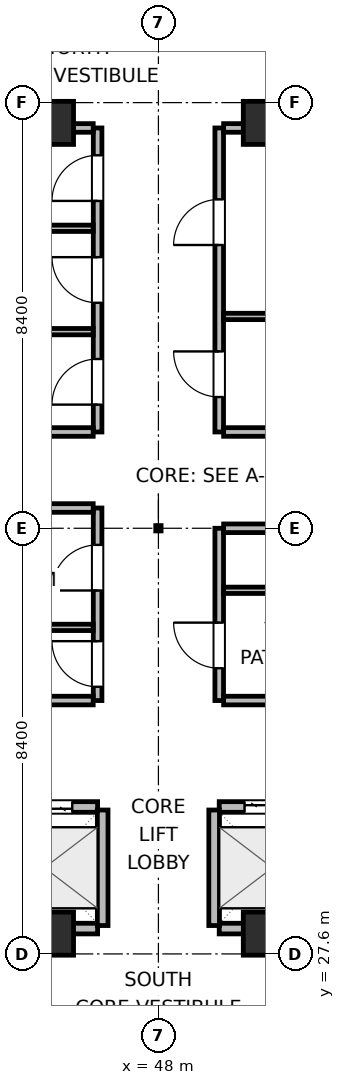
"""IFC4 building model, lengths in metres.
Left out: names, types, materials, properties, quantities, classifications, styles, units other than length and angle.
Written with IfcOpenShell. Run it as: python <this file> out.ifc"""

import sys

from ifc_helpers import new_model, si_unit, direction, frame, frame_2d, origin, origin_2d, place, context, subcontext, project, spatial, rectangle, extrude, element, fill, save


model = new_model("IFC4")
c1 = context("Model", 3, precision=1e-05, world=origin(), true_north=direction((0.0, 1.0)))
c2 = subcontext(c1, "Body", "Model", "MODEL_VIEW")
j1 = project(units=[si_unit("LENGTHUNIT", "METRE"), si_unit("PLANEANGLEUNIT", "RADIAN")], contexts=[c1])
p1 = place(None, origin())
s1 = spatial("IfcSite", under=j1, at=p1, CompositionType="ELEMENT")
p2 = place(p1, origin())
s2 = spatial("IfcBuilding", under=s1, at=p2, CompositionType="ELEMENT")
p3 = place(p2, frame((0.0, 0.0, 105.3)))
s3 = spatial("IfcBuildingStorey", under=s2, at=p3, CompositionType="ELEMENT", Elevation=105.3)
for number, where, z_axis, x_axis in (
    (1, (45.9, 28.0, 0.0), (0.0, 0.0, 1.0), (1.0, 0.0, 0.0)),
    (2, (50.1, 28.0, 0.0), (0.0, 0.0, 1.0), (1.0, 0.0, 0.0)),
    (3, (45.9, 44.0, 0.0), (0.0, 0.0, 1.0), (1.0, 0.0, 0.0)),
    (4, (50.1, 44.0, 0.0), (0.0, 0.0, 1.0), (1.0, 0.0, 0.0)),
):
    element("IfcColumn", number, at=place(p3, frame(where, z_axis=z_axis, x_axis=x_axis)), inside=s3, PredefinedType="COLUMN", context=c2, shape_type="SweptSolid", body=[
        extrude(rectangle(XDim=0.85, YDim=0.85, at=origin_2d()), origin(), (0.0, 0.0, 1.0), 3.9),
    ])
p4 = place(p3, frame((44.7, 30.5, 0.0), z_axis=(0.0, 0.0, 1.0), x_axis=(1.0, 0.0, 0.0)))
e5 = element("IfcWall", 5, at=p4, inside=s3, PredefinedType="PARTITIONING", context=c2, shape_type="SweptSolid", body=[
    extrude(rectangle(XDim=2.1, YDim=0.21, at=frame_2d((1.05, 0.0))), origin(), (0.0, 0.0, 1.0), 3.64),
])
p5 = place(p4, frame((0.5, 0.0, 0.0)))
e6 = element("IfcOpeningElement", 6, at=p5, cuts=e5, PredefinedType="OPENING", context=c2, shape_type="SweptSolid", body=[
    extrude(rectangle(XDim=1.1, YDim=2.04, at=frame_2d((0.55, 1.02))), frame((0.0, 0.115, 0.0), z_axis=(0.0, -1.0, 0.0), x_axis=(1.0, 0.0, 0.0)), (0.0, 0.0, 1.0), 0.23),
])
p6 = place(p3, frame((44.7, 28.1, 0.0), z_axis=(0.0, 0.0, 1.0), x_axis=(1.0, 0.0, 0.0)))
e7 = element("IfcWall", 7, at=p6, inside=s3, PredefinedType="PARTITIONING", context=c2, shape_type="SweptSolid", body=[
    extrude(rectangle(XDim=2.1, YDim=0.21, at=frame_2d((1.05, 0.0))), origin(), (0.0, 0.0, 1.0), 2.525),
])
p7 = place(p3, frame((46.9, 28.16, 0.0), z_axis=(0.0, 0.0, 1.0), x_axis=(0.0, 1.0, 0.0)))
e8 = element("IfcWall", 8, at=p7, inside=s3, PredefinedType="PARTITIONING", context=c2, shape_type="SweptSolid", body=[
    extrude(rectangle(XDim=2.28, YDim=0.21, at=frame_2d((1.14, 0.0))), origin(), (0.0, 0.0, 1.0), 3.64),
])
p8 = place(p3, frame((49.2, 30.5, 0.0), z_axis=(0.0, 0.0, 1.0), x_axis=(1.0, 0.0, 0.0)))
e9 = element("IfcWall", 9, at=p8, inside=s3, PredefinedType="PARTITIONING", context=c2, shape_type="SweptSolid", body=[
    extrude(rectangle(XDim=2.1, YDim=0.21, at=frame_2d((1.05, 0.0))), origin(), (0.0, 0.0, 1.0), 3.64),
])
p9 = place(p8, frame((0.5, 0.0, 0.0)))
e10 = element("IfcOpeningElement", 10, at=p9, cuts=e9, PredefinedType="OPENING", context=c2, shape_type="SweptSolid", body=[
    extrude(rectangle(XDim=1.1, YDim=2.04, at=frame_2d((0.55, 1.02))), frame((0.0, 0.115, 0.0), z_axis=(0.0, -1.0, 0.0), x_axis=(1.0, 0.0, 0.0)), (0.0, 0.0, 1.0), 0.23),
])
p10 = place(p3, frame((49.2, 28.1, 0.0), z_axis=(0.0, 0.0, 1.0), x_axis=(1.0, 0.0, 0.0)))
e11 = element("IfcWall", 11, at=p10, inside=s3, PredefinedType="PARTITIONING", context=c2, shape_type="SweptSolid", body=[
    extrude(rectangle(XDim=2.1, YDim=0.21, at=frame_2d((1.05, 0.0))), origin(), (0.0, 0.0, 1.0), 2.525),
])
p11 = place(p3, frame((49.1, 28.16, 0.0), z_axis=(0.0, 0.0, 1.0), x_axis=(0.0, 1.0, 0.0)))
e12 = element("IfcWall", 12, at=p11, inside=s3, PredefinedType="PARTITIONING", context=c2, shape_type="SweptSolid", body=[
    extrude(rectangle(XDim=2.28, YDim=0.21, at=frame_2d((1.14, 0.0))), origin(), (0.0, 0.0, 1.0), 3.64),
])
p12 = place(p3, frame((46.8, 32.6, 0.0), z_axis=(0.0, 0.0, 1.0), x_axis=(0.0, 1.0, 0.0)))
e13 = element("IfcWall", 13, at=p12, inside=s3, PredefinedType="PARTITIONING", context=c2, shape_type="SweptSolid", body=[
    extrude(rectangle(XDim=3.8, YDim=0.17, at=frame_2d((1.9, 0.0))), origin(), (0.0, 0.0, 1.0), 3.64),
])
p13 = place(p12, frame((0.272, 0.0, 0.0)))
e14 = element("IfcOpeningElement", 14, at=p13, cuts=e13, PredefinedType="OPENING", context=c2, shape_type="SweptSolid", body=[
    extrude(rectangle(XDim=0.9, YDim=2.02, at=frame_2d((0.45, 1.01))), frame((0.0, 0.095, 0.0), z_axis=(0.0, -1.0, 0.0), x_axis=(1.0, 0.0, 0.0)), (0.0, 0.0, 1.0), 0.19),
])
p14 = place(p12, frame((2.172, 0.0, 0.0)))
e15 = element("IfcOpeningElement", 15, at=p14, cuts=e13, PredefinedType="OPENING", context=c2, shape_type="SweptSolid", body=[
    extrude(rectangle(XDim=0.9, YDim=2.02, at=frame_2d((0.45, 1.01))), frame((0.0, 0.095, 0.0), z_axis=(0.0, -1.0, 0.0), x_axis=(1.0, 0.0, 0.0)), (0.0, 0.0, 1.0), 0.19),
])
for number, where, z_axis, x_axis in (
    (16, (43.8, 32.6, 0.0), (0.0, 0.0, 1.0), (1.0, 0.0, 0.0)),
    (17, (43.8, 36.4, 0.0), (0.0, 0.0, 1.0), (1.0, 0.0, 0.0)),
):
    element("IfcWall", number, at=place(p3, frame(where, z_axis=z_axis, x_axis=x_axis)), inside=s3, PredefinedType="PARTITIONING", context=c2, shape_type="SweptSolid", body=[
        extrude(rectangle(XDim=2.913, YDim=0.17, at=frame_2d((1.457, 0.0))), origin(), (0.0, 0.0, 1.0), 3.64),
    ])
p15 = place(p3, frame((43.8, 34.044, 0.0), z_axis=(0.0, 0.0, 1.0), x_axis=(1.0, 0.0, 0.0)))
e18 = element("IfcWall", 18, at=p15, inside=s3, PredefinedType="PARTITIONING", context=c2, shape_type="SweptSolid", body=[
    extrude(rectangle(XDim=2.913, YDim=0.125, at=frame_2d((1.457, 0.0))), origin(), (0.0, 0.0, 1.0), 3.64),
])
p16 = place(p3, frame((49.2, 32.6, 0.0), z_axis=(0.0, 0.0, 1.0), x_axis=(0.0, 1.0, 0.0)))
e19 = element("IfcWall", 19, at=p16, inside=s3, PredefinedType="PARTITIONING", context=c2, shape_type="SweptSolid", body=[
    extrude(rectangle(XDim=3.4, YDim=0.17, at=frame_2d((1.7, 0.0))), origin(), (0.0, 0.0, 1.0), 3.64),
])
p17 = place(p16, frame((0.638, 0.0, 0.0)))
e20 = element("IfcOpeningElement", 20, at=p17, cuts=e19, PredefinedType="OPENING", context=c2, shape_type="SweptSolid", body=[
    extrude(rectangle(XDim=0.9, YDim=2.02, at=frame_2d((0.45, 1.01))), frame((0.0, 0.095, 0.0), z_axis=(0.0, -1.0, 0.0), x_axis=(1.0, 0.0, 0.0)), (0.0, 0.0, 1.0), 0.19),
])
for number, where, z_axis, x_axis in (
    (21, (49.287, 32.6, 0.0), (0.0, 0.0, 1.0), (1.0, 0.0, 0.0)),
    (22, (49.287, 36.0, 0.0), (0.0, 0.0, 1.0), (1.0, 0.0, 0.0)),
):
    element("IfcWall", number, at=place(p3, frame(where, z_axis=z_axis, x_axis=x_axis)), inside=s3, PredefinedType="PARTITIONING", context=c2, shape_type="SweptSolid", body=[
        extrude(rectangle(XDim=2.913, YDim=0.17, at=frame_2d((1.457, 0.0))), origin(), (0.0, 0.0, 1.0), 3.64),
    ])
p18 = place(p3, frame((49.287, 34.776, 0.0), z_axis=(0.0, 0.0, 1.0), x_axis=(1.0, 0.0, 0.0)))
e23 = element("IfcWall", 23, at=p18, inside=s3, PredefinedType="PARTITIONING", context=c2, shape_type="SweptSolid", body=[
    extrude(rectangle(XDim=2.913, YDim=0.125, at=frame_2d((1.457, 0.0))), origin(), (0.0, 0.0, 1.0), 3.64),
])
p19 = place(p3, frame((46.8, 37.9, 0.0), z_axis=(0.0, 0.0, 1.0), x_axis=(0.0, 1.0, 0.0)))
e24 = element("IfcWall", 24, at=p19, inside=s3, PredefinedType="PARTITIONING", context=c2, shape_type="SweptSolid", body=[
    extrude(rectangle(XDim=6.0, YDim=0.17, at=frame_2d((3.0, 0.0))), origin(), (0.0, 0.0, 1.0), 3.64),
])
p20 = place(p19, frame((0.54, 0.0, 0.0)))
e25 = element("IfcOpeningElement", 25, at=p20, cuts=e24, PredefinedType="OPENING", context=c2, shape_type="SweptSolid", body=[
    extrude(rectangle(XDim=0.9, YDim=2.02, at=frame_2d((0.45, 1.01))), frame((0.0, 0.095, 0.0), z_axis=(0.0, -1.0, 0.0), x_axis=(1.0, 0.0, 0.0)), (0.0, 0.0, 1.0), 0.19),
])
p21 = place(p19, frame((2.55, 0.0, 0.0)))
e26 = element("IfcOpeningElement", 26, at=p21, cuts=e24, PredefinedType="OPENING", context=c2, shape_type="SweptSolid", body=[
    extrude(rectangle(XDim=0.9, YDim=2.02, at=frame_2d((0.45, 1.01))), frame((0.0, 0.095, 0.0), z_axis=(0.0, -1.0, 0.0), x_axis=(1.0, 0.0, 0.0)), (0.0, 0.0, 1.0), 0.19),
])
p22 = place(p19, frame((4.56, 0.0, 0.0)))
e27 = element("IfcOpeningElement", 27, at=p22, cuts=e24, PredefinedType="OPENING", context=c2, shape_type="SweptSolid", body=[
    extrude(rectangle(XDim=0.9, YDim=2.02, at=frame_2d((0.45, 1.01))), frame((0.0, 0.095, 0.0), z_axis=(0.0, -1.0, 0.0), x_axis=(1.0, 0.0, 0.0)), (0.0, 0.0, 1.0), 0.19),
])
p23 = place(p3, frame((42.5, 37.9, 0.0), z_axis=(0.0, 0.0, 1.0), x_axis=(1.0, 0.0, 0.0)))
e28 = element("IfcWall", 28, at=p23, inside=s3, PredefinedType="PARTITIONING", context=c2, shape_type="SweptSolid", body=[
    extrude(rectangle(XDim=4.213, YDim=0.17, at=frame_2d((2.106, 0.0))), origin(), (0.0, 0.0, 1.0), 3.64),
])
p24 = place(p3, frame((42.5, 43.9, 0.0), z_axis=(0.0, 0.0, 1.0), x_axis=(1.0, 0.0, 0.0)))
e29 = element("IfcWall", 29, at=p24, inside=s3, PredefinedType="PARTITIONING", context=c2, shape_type="SweptSolid", body=[
    extrude(rectangle(XDim=4.213, YDim=0.17, at=frame_2d((2.106, 0.0))), origin(), (0.0, 0.0, 1.0), 2.525),
])
for number, where, z_axis, x_axis in (
    (30, (42.5, 39.88, 0.0), (0.0, 0.0, 1.0), (1.0, 0.0, 0.0)),
    (31, (42.5, 41.92, 0.0), (0.0, 0.0, 1.0), (1.0, 0.0, 0.0)),
):
    element("IfcWall", number, at=place(p3, frame(where, z_axis=z_axis, x_axis=x_axis)), inside=s3, PredefinedType="PARTITIONING", context=c2, shape_type="SweptSolid", body=[
        extrude(rectangle(XDim=4.213, YDim=0.125, at=frame_2d((2.106, 0.0))), origin(), (0.0, 0.0, 1.0), 3.64),
    ])
p25 = place(p3, frame((49.2, 37.9, 0.0), z_axis=(0.0, 0.0, 1.0), x_axis=(0.0, 1.0, 0.0)))
e32 = element("IfcWall", 32, at=p25, inside=s3, PredefinedType="PARTITIONING", context=c2, shape_type="SweptSolid", body=[
    extrude(rectangle(XDim=6.0, YDim=0.17, at=frame_2d((3.0, 0.0))), origin(), (0.0, 0.0, 1.0), 3.64),
])
p26 = place(p25, frame((0.69, 0.0, 0.0)))
e33 = element("IfcOpeningElement", 33, at=p26, cuts=e32, PredefinedType="OPENING", context=c2, shape_type="SweptSolid", body=[
    extrude(rectangle(XDim=0.9, YDim=2.02, at=frame_2d((0.45, 1.01))), frame((0.0, 0.095, 0.0), z_axis=(0.0, -1.0, 0.0), x_axis=(1.0, 0.0, 0.0)), (0.0, 0.0, 1.0), 0.19),
])
p27 = place(p25, frame((3.69, 0.0, 0.0)))
e34 = element("IfcOpeningElement", 34, at=p27, cuts=e32, PredefinedType="OPENING", context=c2, shape_type="SweptSolid", body=[
    extrude(rectangle(XDim=0.9, YDim=2.02, at=frame_2d((0.45, 1.01))), frame((0.0, 0.095, 0.0), z_axis=(0.0, -1.0, 0.0), x_axis=(1.0, 0.0, 0.0)), (0.0, 0.0, 1.0), 0.19),
])
p28 = place(p3, frame((49.287, 37.9, 0.0), z_axis=(0.0, 0.0, 1.0), x_axis=(1.0, 0.0, 0.0)))
e35 = element("IfcWall", 35, at=p28, inside=s3, PredefinedType="PARTITIONING", context=c2, shape_type="SweptSolid", body=[
    extrude(rectangle(XDim=4.113, YDim=0.17, at=frame_2d((2.056, 0.0))), origin(), (0.0, 0.0, 1.0), 3.64),
])
p29 = place(p3, frame((49.287, 43.9, 0.0), z_axis=(0.0, 0.0, 1.0), x_axis=(1.0, 0.0, 0.0)))
e36 = element("IfcWall", 36, at=p29, inside=s3, PredefinedType="PARTITIONING", context=c2, shape_type="SweptSolid", body=[
    extrude(rectangle(XDim=4.113, YDim=0.17, at=frame_2d((2.056, 0.0))), origin(), (0.0, 0.0, 1.0), 2.525),
])
p30 = place(p3, frame((49.287, 40.18, 0.0), z_axis=(0.0, 0.0, 1.0), x_axis=(1.0, 0.0, 0.0)))
e37 = element("IfcWall", 37, at=p30, inside=s3, PredefinedType="PARTITIONING", context=c2, shape_type="SweptSolid", body=[
    extrude(rectangle(XDim=4.113, YDim=0.125, at=frame_2d((2.056, 0.0))), origin(), (0.0, 0.0, 1.0), 3.64),
])
p31 = place(p5, origin())
e38 = element("IfcDoor", 38, at=p31, inside=s3, OperationType="DOUBLE_DOOR_SLIDING", PredefinedType="DOOR", context=c2, shape_type="SweptSolid", body=[
    extrude(rectangle(XDim=1.1, YDim=2.04, at=frame_2d((0.55, 1.02))), frame((0.0, 0.025, 0.0), z_axis=(0.0, -1.0, 0.0), x_axis=(1.0, 0.0, 0.0)), (0.0, 0.0, 1.0), 0.05),
])
fill(e6, e38)
p32 = place(p9, origin())
e39 = element("IfcDoor", 39, at=p32, inside=s3, OperationType="DOUBLE_DOOR_SLIDING", PredefinedType="DOOR", context=c2, shape_type="SweptSolid", body=[
    extrude(rectangle(XDim=1.1, YDim=2.04, at=frame_2d((0.55, 1.02))), frame((0.0, 0.025, 0.0), z_axis=(0.0, -1.0, 0.0), x_axis=(1.0, 0.0, 0.0)), (0.0, 0.0, 1.0), 0.05),
])
fill(e10, e39)
p33 = place(p13, origin())
e40 = element("IfcDoor", 40, at=p33, inside=s3, OperationType="SINGLE_SWING_RIGHT", PredefinedType="DOOR", context=c2, shape_type="SweptSolid", body=[
    extrude(rectangle(XDim=0.9, YDim=2.02, at=frame_2d((0.45, 1.01))), frame((0.0, 0.025, 0.0), z_axis=(0.0, -1.0, 0.0), x_axis=(1.0, 0.0, 0.0)), (0.0, 0.0, 1.0), 0.05),
])
fill(e14, e40)
p34 = place(p14, origin())
e41 = element("IfcDoor", 41, at=p34, inside=s3, OperationType="SINGLE_SWING_LEFT", PredefinedType="DOOR", context=c2, shape_type="SweptSolid", body=[
    extrude(rectangle(XDim=0.9, YDim=2.02, at=frame_2d((0.45, 1.01))), frame((0.0, 0.025, 0.0), z_axis=(0.0, -1.0, 0.0), x_axis=(1.0, 0.0, 0.0)), (0.0, 0.0, 1.0), 0.05),
])
fill(e15, e41)
p35 = place(p17, origin())
e42 = element("IfcDoor", 42, at=p35, inside=s3, OperationType="SINGLE_SWING_RIGHT", PredefinedType="DOOR", context=c2, shape_type="SweptSolid", body=[
    extrude(rectangle(XDim=0.9, YDim=2.02, at=frame_2d((0.45, 1.01))), frame((0.0, 0.025, 0.0), z_axis=(0.0, -1.0, 0.0), x_axis=(1.0, 0.0, 0.0)), (0.0, 0.0, 1.0), 0.05),
])
fill(e20, e42)
p36 = place(p20, origin())
e43 = element("IfcDoor", 43, at=p36, inside=s3, OperationType="SINGLE_SWING_LEFT", PredefinedType="DOOR", context=c2, shape_type="SweptSolid", body=[
    extrude(rectangle(XDim=0.9, YDim=2.02, at=frame_2d((0.45, 1.01))), frame((0.0, 0.025, 0.0), z_axis=(0.0, -1.0, 0.0), x_axis=(1.0, 0.0, 0.0)), (0.0, 0.0, 1.0), 0.05),
])
fill(e25, e43)
p37 = place(p21, origin())
e44 = element("IfcDoor", 44, at=p37, inside=s3, OperationType="SINGLE_SWING_RIGHT", PredefinedType="DOOR", context=c2, shape_type="SweptSolid", body=[
    extrude(rectangle(XDim=0.9, YDim=2.02, at=frame_2d((0.45, 1.01))), frame((0.0, 0.025, 0.0), z_axis=(0.0, -1.0, 0.0), x_axis=(1.0, 0.0, 0.0)), (0.0, 0.0, 1.0), 0.05),
])
fill(e26, e44)
p38 = place(p22, origin())
e45 = element("IfcDoor", 45, at=p38, inside=s3, OperationType="SINGLE_SWING_LEFT", PredefinedType="DOOR", context=c2, shape_type="SweptSolid", body=[
    extrude(rectangle(XDim=0.9, YDim=2.02, at=frame_2d((0.45, 1.01))), frame((0.0, 0.025, 0.0), z_axis=(0.0, -1.0, 0.0), x_axis=(1.0, 0.0, 0.0)), (0.0, 0.0, 1.0), 0.05),
])
fill(e27, e45)
p39 = place(p26, origin())
e46 = element("IfcDoor", 46, at=p39, inside=s3, OperationType="SINGLE_SWING_RIGHT", PredefinedType="DOOR", context=c2, shape_type="SweptSolid", body=[
    extrude(rectangle(XDim=0.9, YDim=2.02, at=frame_2d((0.45, 1.01))), frame((0.0, 0.025, 0.0), z_axis=(0.0, -1.0, 0.0), x_axis=(1.0, 0.0, 0.0)), (0.0, 0.0, 1.0), 0.05),
])
fill(e33, e46)
p40 = place(p27, origin())
e47 = element("IfcDoor", 47, at=p40, inside=s3, OperationType="SINGLE_SWING_LEFT", PredefinedType="DOOR", context=c2, shape_type="SweptSolid", body=[
    extrude(rectangle(XDim=0.9, YDim=2.02, at=frame_2d((0.45, 1.01))), frame((0.0, 0.025, 0.0), z_axis=(0.0, -1.0, 0.0), x_axis=(1.0, 0.0, 0.0)), (0.0, 0.0, 1.0), 0.05),
])
fill(e34, e47)
save(model, sys.argv[1])
